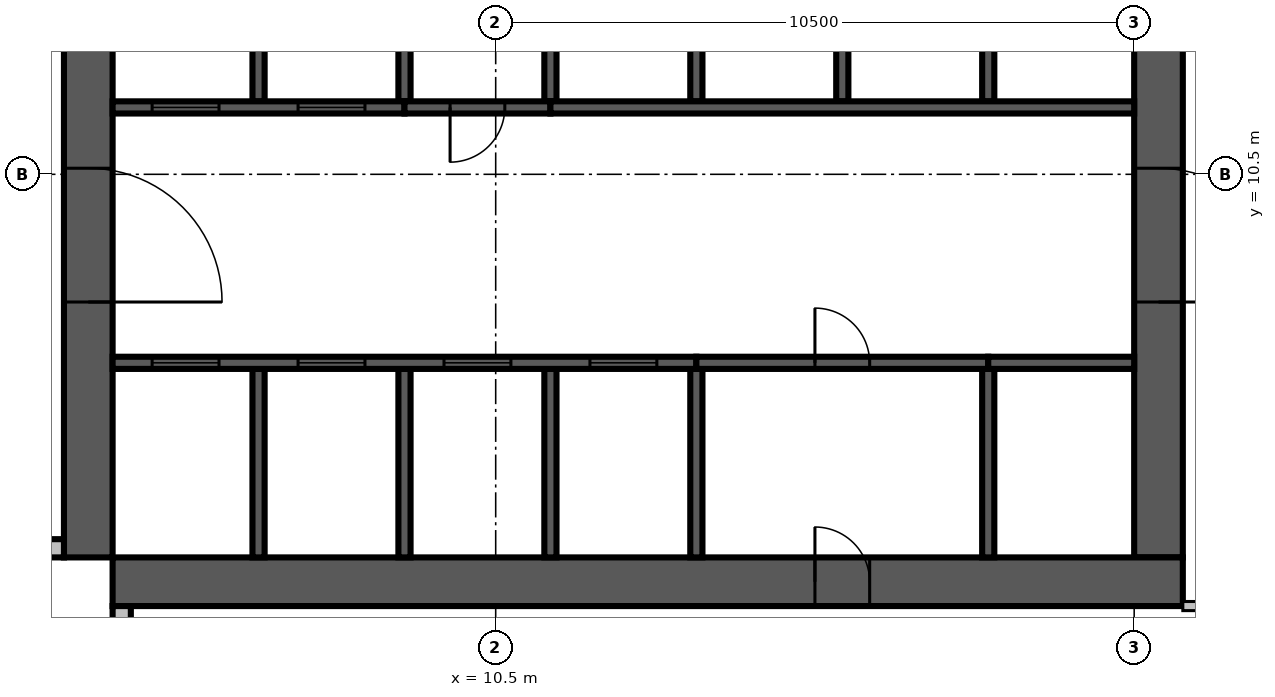
"""IFC4 building model, lengths in metres.
Left out: names, types, materials, properties, quantities, classifications, styles, units other than length and angle.
Written with IfcOpenShell. Run it as: python <this file> out.ifc"""

import sys

from ifc_helpers import new_model, si_unit, direction, frame, frame_2d, origin, place, context, subcontext, project, spatial, rectangle, extrude, source, transform, mapped, element, fill, save


model = new_model("IFC4")
c1 = context("Model", 3, precision=1e-05, world=origin(), true_north=direction((0.0, 1.0)))
c2 = subcontext(c1, "Body", "Model", "MODEL_VIEW")
j1 = project(units=[si_unit("LENGTHUNIT", "METRE"), si_unit("PLANEANGLEUNIT", "RADIAN")], contexts=[c1])
p1 = place(None, origin())
s1 = spatial("IfcSite", under=j1, at=p1, CompositionType="ELEMENT")
p2 = place(p1, origin())
s2 = spatial("IfcBuilding", under=s1, at=p2, CompositionType="ELEMENT")
p3 = place(p2, frame((0.0, 0.0, 189.2)))
s3 = spatial("IfcBuildingStorey", under=s2, at=p3, CompositionType="ELEMENT", Elevation=189.2)
m1 = source(origin(), c2, "Body", "SweptSolid", [
    extrude(rectangle(XDim=17.6, YDim=0.8, at=frame_2d((8.8, 0.0))), origin(), (0.0, 0.0, 1.0), 3.8),
])
p4 = place(p3, frame((3.8, 4.2, 0.0), z_axis=(0.0, 0.0, 1.0), x_axis=(0.0, 1.0, 0.0)))
e1 = element("IfcWall", 1, at=p4, inside=s3, PredefinedType="SHEAR", context=c2, shape_type="MappedRepresentation", body=[
    mapped(m1, transform((0.0, 0.0, 0.0), scale=1.0)),
])
m2 = source(origin(), c2, "Body", "SweptSolid", [
    extrude(rectangle(XDim=2.2, YDim=2.1, at=frame_2d((1.1, 1.05))), frame((0.0, 0.41, 0.0), z_axis=(0.0, -1.0, 0.0), x_axis=(1.0, 0.0, 0.0)), (0.0, 0.0, 1.0), 0.82),
])
p5 = place(p4, frame((4.2, 0.0, 0.0)))
e2 = element("IfcOpeningElement", 2, at=p5, cuts=e1, PredefinedType="OPENING", context=c2, shape_type="MappedRepresentation", body=[
    mapped(m2, transform((0.0, 0.0, 0.0), scale=1.0)),
])
m3 = source(origin(), c2, "Body", "SweptSolid", [
    extrude(rectangle(XDim=0.9, YDim=2.1, at=frame_2d((0.45, 1.05))), frame((0.0, 0.41, 0.0), z_axis=(0.0, -1.0, 0.0), x_axis=(1.0, 0.0, 0.0)), (0.0, 0.0, 1.0), 0.82),
])
p6 = place(p4, frame((10.95, 0.0, 0.0)))
e3 = element("IfcOpeningElement", 3, at=p6, cuts=e1, PredefinedType="OPENING", context=c2, shape_type="MappedRepresentation", body=[
    mapped(m3, transform((0.0, 0.0, 0.0), scale=1.0)),
])
m4 = source(origin(), c2, "Body", "SweptSolid", [
    extrude(rectangle(XDim=16.8, YDim=0.8, at=frame_2d((8.4, 0.0))), origin(), (0.0, 0.0, 1.0), 3.8),
])
p7 = place(p3, frame((21.4, 4.2, 0.0), z_axis=(0.0, 0.0, 1.0), x_axis=(0.0, 1.0, 0.0)))
e4 = element("IfcWall", 4, at=p7, inside=s3, PredefinedType="SHEAR", context=c2, shape_type="MappedRepresentation", body=[
    mapped(m4, transform((0.0, 0.0, 0.0), scale=1.0)),
])
p8 = place(p7, frame((4.2, 0.0, 0.0)))
e5 = element("IfcOpeningElement", 5, at=p8, cuts=e4, PredefinedType="OPENING", context=c2, shape_type="MappedRepresentation", body=[
    mapped(m2, transform((0.0, 0.0, 0.0), scale=1.0)),
])
m5 = source(origin(), c2, "Body", "SweptSolid", [
    extrude(rectangle(XDim=1.2, YDim=2.1, at=frame_2d((0.6, 1.05))), frame((0.0, 0.41, 0.0), z_axis=(0.0, -1.0, 0.0), x_axis=(1.0, 0.0, 0.0)), (0.0, 0.0, 1.0), 0.82),
])
p9 = place(p7, frame((14.7, 0.0, 0.0)))
e6 = element("IfcOpeningElement", 6, at=p9, cuts=e4, PredefinedType="OPENING", context=c2, shape_type="MappedRepresentation", body=[
    mapped(m5, transform((0.0, 0.0, 0.0), scale=1.0)),
])
p10 = place(p3, frame((4.2, 3.8, 0.0), z_axis=(0.0, 0.0, 1.0), x_axis=(1.0, 0.0, 0.0)))
e7 = element("IfcWall", 7, at=p10, inside=s3, PredefinedType="SHEAR", context=c2, shape_type="MappedRepresentation", body=[
    mapped(m1, transform((0.0, 0.0, 0.0), scale=1.0)),
])
p11 = place(p10, frame((11.55, 0.0, 0.0)))
e8 = element("IfcOpeningElement", 8, at=p11, cuts=e7, PredefinedType="OPENING", context=c2, shape_type="MappedRepresentation", body=[
    mapped(m3, transform((0.0, 0.0, 0.0), scale=1.0)),
])
m6 = source(origin(), c2, "Body", "SweptSolid", [
    extrude(rectangle(XDim=3.4, YDim=0.3, at=frame_2d((1.7, 0.0))), origin(), (0.0, 0.0, 1.0), 3.4),
])
p12 = place(p3, frame((0.0, 4.35, 0.0), z_axis=(0.0, 0.0, 1.0), x_axis=(1.0, 0.0, 0.0)))
e9 = element("IfcWall", 9, at=p12, inside=s3, PredefinedType="STANDARD", context=c2, shape_type="MappedRepresentation", body=[
    mapped(m6, transform((0.0, 0.0, 0.0), scale=1.0)),
])
m7 = source(origin(), c2, "Body", "SweptSolid", [
    extrude(rectangle(XDim=1.8, YDim=2.3, at=frame_2d((0.9, 1.15))), frame((0.0, 0.16, 0.0), z_axis=(0.0, -1.0, 0.0), x_axis=(1.0, 0.0, 0.0)), (0.0, 0.0, 1.0), 0.32),
])
p13 = place(p12, frame((1.2, 0.0, 0.6)))
e10 = element("IfcOpeningElement", 10, at=p13, cuts=e9, PredefinedType="OPENING", context=c2, shape_type="MappedRepresentation", body=[
    mapped(m7, transform((0.0, 0.0, 0.0), scale=1.0)),
])
p14 = place(p3, frame((4.35, 3.4, 0.0), z_axis=(0.0, 0.0, 1.0), x_axis=(0.0, -1.0, 0.0)))
e11 = element("IfcWall", 11, at=p14, inside=s3, PredefinedType="STANDARD", context=c2, shape_type="MappedRepresentation", body=[
    mapped(m6, transform((0.0, 0.0, 0.0), scale=1.0)),
])
p15 = place(p14, frame((0.4, 0.0, 0.6)))
e12 = element("IfcOpeningElement", 12, at=p15, cuts=e11, PredefinedType="OPENING", context=c2, shape_type="MappedRepresentation", body=[
    mapped(m7, transform((0.0, 0.0, 0.0), scale=1.0)),
])
m8 = source(origin(), c2, "Body", "SweptSolid", [
    extrude(rectangle(XDim=3.1, YDim=0.2, at=frame_2d((1.55, 0.0))), origin(), (0.0, 0.0, 1.0), 3.8),
])
for number, where, z_axis, x_axis in (
    (13, (6.6, 4.2, 0.0), (0.0, 0.0, 1.0), (0.0, 1.0, 0.0)),
    (14, (9.0, 4.2, 0.0), (0.0, 0.0, 1.0), (0.0, 1.0, 0.0)),
    (15, (11.4, 4.2, 0.0), (0.0, 0.0, 1.0), (0.0, 1.0, 0.0)),
):
    element("IfcWall", number, at=place(p3, frame(where, z_axis=z_axis, x_axis=x_axis)), inside=s3, PredefinedType="SOLIDWALL", context=c2, shape_type="MappedRepresentation", body=[
        mapped(m8, transform((0.0, 0.0, 0.0), scale=1.0)),
    ])
m9 = source(origin(), c2, "Body", "SweptSolid", [
    extrude(rectangle(XDim=3.1, YDim=0.2, at=frame_2d((1.55, 0.0))), origin(), (0.0, 0.0, 1.0), 3.4),
])
for number, where, z_axis, x_axis in (
    (16, (13.8, 4.2, 0.0), (0.0, 0.0, 1.0), (0.0, 1.0, 0.0)),
    (17, (18.6, 4.2, 0.0), (0.0, 0.0, 1.0), (0.0, 1.0, 0.0)),
):
    element("IfcWall", number, at=place(p3, frame(where, z_axis=z_axis, x_axis=x_axis)), inside=s3, PredefinedType="SOLIDWALL", context=c2, shape_type="MappedRepresentation", body=[
        mapped(m9, transform((0.0, 0.0, 0.0), scale=1.0)),
    ])
m10 = source(origin(), c2, "Body", "SweptSolid", [
    extrude(rectangle(XDim=3.0, YDim=0.2, at=frame_2d((1.5, 0.0))), origin(), (0.0, 0.0, 1.0), 3.8),
])
p16 = place(p3, frame((6.6, 11.7, 0.0), z_axis=(0.0, 0.0, 1.0), x_axis=(0.0, 1.0, 0.0)))
e18 = element("IfcWall", 18, at=p16, inside=s3, PredefinedType="SOLIDWALL", context=c2, shape_type="MappedRepresentation", body=[
    mapped(m10, transform((0.0, 0.0, 0.0), scale=1.0)),
])
m11 = source(origin(), c2, "Body", "SweptSolid", [
    extrude(rectangle(XDim=3.0, YDim=0.2, at=frame_2d((1.5, 0.0))), origin(), (0.0, 0.0, 1.0), 3.4),
])
for number, where, z_axis, x_axis in (
    (19, (9.0, 11.7, 0.0), (0.0, 0.0, 1.0), (0.0, 1.0, 0.0)),
    (20, (11.4, 11.7, 0.0), (0.0, 0.0, 1.0), (0.0, 1.0, 0.0)),
):
    element("IfcWall", number, at=place(p3, frame(where, z_axis=z_axis, x_axis=x_axis)), inside=s3, PredefinedType="SOLIDWALL", context=c2, shape_type="MappedRepresentation", body=[
        mapped(m11, transform((0.0, 0.0, 0.0), scale=1.0)),
    ])
for number, where, z_axis, x_axis in (
    (21, (13.8, 11.7, 0.0), (0.0, 0.0, 1.0), (0.0, 1.0, 0.0)),
    (22, (16.2, 11.7, 0.0), (0.0, 0.0, 1.0), (0.0, 1.0, 0.0)),
    (23, (18.6, 11.7, 0.0), (0.0, 0.0, 1.0), (0.0, 1.0, 0.0)),
):
    element("IfcWall", number, at=place(p3, frame(where, z_axis=z_axis, x_axis=x_axis)), inside=s3, PredefinedType="SOLIDWALL", context=c2, shape_type="MappedRepresentation", body=[
        mapped(m10, transform((0.0, 0.0, 0.0), scale=1.0)),
    ])
m12 = source(origin(), c2, "Body", "SweptSolid", [
    extrude(rectangle(XDim=9.6, YDim=0.2, at=frame_2d((4.8, 0.0))), origin(), (0.0, 0.0, 1.0), 3.8),
])
p17 = place(p3, frame((4.2, 7.4, 0.0), z_axis=(0.0, 0.0, 1.0), x_axis=(1.0, 0.0, 0.0)))
e24 = element("IfcWall", 24, at=p17, inside=s3, PredefinedType="SOLIDWALL", context=c2, shape_type="MappedRepresentation", body=[
    mapped(m12, transform((0.0, 0.0, 0.0), scale=1.0)),
])
m13 = source(origin(), c2, "Body", "SweptSolid", [
    extrude(rectangle(XDim=1.1, YDim=2.1, at=frame_2d((0.55, 1.05))), frame((0.0, 0.11, 0.0), z_axis=(0.0, -1.0, 0.0), x_axis=(1.0, 0.0, 0.0)), (0.0, 0.0, 1.0), 0.22),
])
p18 = place(p17, frame((0.65, 0.0, 0.0)))
e25 = element("IfcOpeningElement", 25, at=p18, cuts=e24, PredefinedType="OPENING", context=c2, shape_type="MappedRepresentation", body=[
    mapped(m13, transform((0.0, 0.0, 0.0), scale=1.0)),
])
p19 = place(p17, frame((3.05, 0.0, 0.0)))
e26 = element("IfcOpeningElement", 26, at=p19, cuts=e24, PredefinedType="OPENING", context=c2, shape_type="MappedRepresentation", body=[
    mapped(m13, transform((0.0, 0.0, 0.0), scale=1.0)),
])
p20 = place(p17, frame((5.45, 0.0, 0.0)))
e27 = element("IfcOpeningElement", 27, at=p20, cuts=e24, PredefinedType="OPENING", context=c2, shape_type="MappedRepresentation", body=[
    mapped(m13, transform((0.0, 0.0, 0.0), scale=1.0)),
])
p21 = place(p17, frame((7.85, 0.0, 0.0)))
e28 = element("IfcOpeningElement", 28, at=p21, cuts=e24, PredefinedType="OPENING", context=c2, shape_type="MappedRepresentation", body=[
    mapped(m13, transform((0.0, 0.0, 0.0), scale=1.0)),
])
m14 = source(origin(), c2, "Body", "SweptSolid", [
    extrude(rectangle(XDim=4.8, YDim=0.2, at=frame_2d((2.4, 0.0))), origin(), (0.0, 0.0, 1.0), 3.4),
])
p22 = place(p3, frame((13.8, 7.4, 0.0), z_axis=(0.0, 0.0, 1.0), x_axis=(1.0, 0.0, 0.0)))
e29 = element("IfcWall", 29, at=p22, inside=s3, PredefinedType="SOLIDWALL", context=c2, shape_type="MappedRepresentation", body=[
    mapped(m14, transform((0.0, 0.0, 0.0), scale=1.0)),
])
m15 = source(origin(), c2, "Body", "SweptSolid", [
    extrude(rectangle(XDim=0.9, YDim=2.1, at=frame_2d((0.45, 1.05))), frame((0.0, 0.11, 0.0), z_axis=(0.0, -1.0, 0.0), x_axis=(1.0, 0.0, 0.0)), (0.0, 0.0, 1.0), 0.22),
])
p23 = place(p22, frame((1.95, 0.0, 0.0)))
e30 = element("IfcOpeningElement", 30, at=p23, cuts=e29, PredefinedType="OPENING", context=c2, shape_type="MappedRepresentation", body=[
    mapped(m15, transform((0.0, 0.0, 0.0), scale=1.0)),
])
m16 = source(origin(), c2, "Body", "SweptSolid", [
    extrude(rectangle(XDim=2.4, YDim=0.2, at=frame_2d((1.2, 0.0))), origin(), (0.0, 0.0, 1.0), 3.8),
])
p24 = place(p3, frame((18.6, 7.4, 0.0), z_axis=(0.0, 0.0, 1.0), x_axis=(1.0, 0.0, 0.0)))
e31 = element("IfcWall", 31, at=p24, inside=s3, PredefinedType="SOLIDWALL", context=c2, shape_type="MappedRepresentation", body=[
    mapped(m16, transform((0.0, 0.0, 0.0), scale=1.0)),
])
m17 = source(origin(), c2, "Body", "SweptSolid", [
    extrude(rectangle(XDim=4.8, YDim=0.2, at=frame_2d((2.4, 0.0))), origin(), (0.0, 0.0, 1.0), 3.8),
])
p25 = place(p3, frame((4.2, 11.6, 0.0), z_axis=(0.0, 0.0, 1.0), x_axis=(1.0, 0.0, 0.0)))
e32 = element("IfcWall", 32, at=p25, inside=s3, PredefinedType="SOLIDWALL", context=c2, shape_type="MappedRepresentation", body=[
    mapped(m17, transform((0.0, 0.0, 0.0), scale=1.0)),
])
p26 = place(p25, frame((0.65, 0.0, 0.0)))
e33 = element("IfcOpeningElement", 33, at=p26, cuts=e32, PredefinedType="OPENING", context=c2, shape_type="MappedRepresentation", body=[
    mapped(m13, transform((0.0, 0.0, 0.0), scale=1.0)),
])
p27 = place(p25, frame((3.05, 0.0, 0.0)))
e34 = element("IfcOpeningElement", 34, at=p27, cuts=e32, PredefinedType="OPENING", context=c2, shape_type="MappedRepresentation", body=[
    mapped(m13, transform((0.0, 0.0, 0.0), scale=1.0)),
])
m18 = source(origin(), c2, "Body", "SweptSolid", [
    extrude(rectangle(XDim=2.4, YDim=0.2, at=frame_2d((1.2, 0.0))), origin(), (0.0, 0.0, 1.0), 3.4),
])
p28 = place(p3, frame((9.0, 11.6, 0.0), z_axis=(0.0, 0.0, 1.0), x_axis=(1.0, 0.0, 0.0)))
e35 = element("IfcWall", 35, at=p28, inside=s3, PredefinedType="SOLIDWALL", context=c2, shape_type="MappedRepresentation", body=[
    mapped(m18, transform((0.0, 0.0, 0.0), scale=1.0)),
])
p29 = place(p28, frame((0.75, 0.0, 0.0)))
e36 = element("IfcOpeningElement", 36, at=p29, cuts=e35, PredefinedType="OPENING", context=c2, shape_type="MappedRepresentation", body=[
    mapped(m15, transform((0.0, 0.0, 0.0), scale=1.0)),
])
p30 = place(p3, frame((11.4, 11.6, 0.0), z_axis=(0.0, 0.0, 1.0), x_axis=(1.0, 0.0, 0.0)))
e37 = element("IfcWall", 37, at=p30, inside=s3, PredefinedType="SOLIDWALL", context=c2, shape_type="MappedRepresentation", body=[
    mapped(m12, transform((0.0, 0.0, 0.0), scale=1.0)),
])
m19 = source(origin(), c2, "Body", "SweptSolid", [
    extrude(rectangle(XDim=7.525, YDim=0.15, at=frame_2d((3.763, 0.0))), origin(), (0.0, 0.0, 1.0), 2.9),
])
p31 = place(p3, frame((21.8, 3.4, 0.0), z_axis=(0.0, 0.0, 1.0), x_axis=(1.0, 0.0, 0.0)))
e38 = element("IfcWall", 38, at=p31, inside=s3, PredefinedType="PARTITIONING", context=c2, shape_type="MappedRepresentation", body=[
    mapped(m19, transform((0.0, 0.0, 0.0), scale=1.0)),
])
m20 = source(origin(), c2, "Body", "SweptSolid", [
    extrude(rectangle(XDim=1.0, YDim=2.1, at=frame_2d((0.5, 1.05))), frame((0.0, 0.085, 0.0), z_axis=(0.0, -1.0, 0.0), x_axis=(1.0, 0.0, 0.0)), (0.0, 0.0, 1.0), 0.17),
])
p32 = place(p31, frame((3.3, 0.0, 0.0)))
e39 = element("IfcOpeningElement", 39, at=p32, cuts=e38, PredefinedType="OPENING", context=c2, shape_type="MappedRepresentation", body=[
    mapped(m20, transform((0.0, 0.0, 0.0), scale=1.0)),
])
m21 = source(origin(), c2, "Body", "SweptSolid", [
    extrude(rectangle(XDim=0.9, YDim=2.1, at=frame_2d((0.45, 1.05))), frame((0.0, 0.085, 0.0), z_axis=(0.0, -1.0, 0.0), x_axis=(1.0, 0.0, 0.0)), (0.0, 0.0, 1.0), 0.17),
])
p33 = place(p31, frame((2.312, 0.0, 0.0)))
e40 = element("IfcOpeningElement", 40, at=p33, cuts=e38, PredefinedType="OPENING", context=c2, shape_type="MappedRepresentation", body=[
    mapped(m21, transform((0.0, 0.0, 0.0), scale=1.0)),
])
m22 = source(origin(), c2, "Body", "SweptSolid", [
    extrude(rectangle(XDim=1.1, YDim=2.1, at=frame_2d((0.55, 1.05))), frame((0.0, 0.025, 0.0), z_axis=(0.0, -1.0, 0.0), x_axis=(1.0, 0.0, 0.0)), (0.0, 0.0, 1.0), 0.05),
])
p34 = place(p18, origin())
e41 = element("IfcDoor", 41, at=p34, inside=s3, OperationType="SLIDING_TO_LEFT", PredefinedType="DOOR", context=c2, shape_type="MappedRepresentation", body=[
    mapped(m22, transform((0.0, 0.0, 0.0), scale=1.0)),
])
fill(e25, e41)
p35 = place(p19, origin())
e42 = element("IfcDoor", 42, at=p35, inside=s3, OperationType="SLIDING_TO_LEFT", PredefinedType="DOOR", context=c2, shape_type="MappedRepresentation", body=[
    mapped(m22, transform((0.0, 0.0, 0.0), scale=1.0)),
])
fill(e26, e42)
p36 = place(p20, origin())
e43 = element("IfcDoor", 43, at=p36, inside=s3, OperationType="SLIDING_TO_LEFT", PredefinedType="DOOR", context=c2, shape_type="MappedRepresentation", body=[
    mapped(m22, transform((0.0, 0.0, 0.0), scale=1.0)),
])
fill(e27, e43)
p37 = place(p21, origin())
e44 = element("IfcDoor", 44, at=p37, inside=s3, OperationType="SLIDING_TO_LEFT", PredefinedType="DOOR", context=c2, shape_type="MappedRepresentation", body=[
    mapped(m22, transform((0.0, 0.0, 0.0), scale=1.0)),
])
fill(e28, e44)
m23 = source(origin(), c2, "Body", "SweptSolid", [
    extrude(rectangle(XDim=0.9, YDim=2.1, at=frame_2d((0.45, 1.05))), frame((0.0, 0.025, 0.0), z_axis=(0.0, -1.0, 0.0), x_axis=(1.0, 0.0, 0.0)), (0.0, 0.0, 1.0), 0.05),
])
p38 = place(p23, origin())
e45 = element("IfcDoor", 45, at=p38, inside=s3, OperationType="SINGLE_SWING_LEFT", PredefinedType="DOOR", context=c2, shape_type="MappedRepresentation", body=[
    mapped(m23, transform((0.0, 0.0, 0.0), scale=1.0)),
])
fill(e30, e45)
p39 = place(p26, origin())
e46 = element("IfcDoor", 46, at=p39, inside=s3, OperationType="SLIDING_TO_LEFT", PredefinedType="DOOR", context=c2, shape_type="MappedRepresentation", body=[
    mapped(m22, transform((0.0, 0.0, 0.0), scale=1.0)),
])
fill(e33, e46)
p40 = place(p27, origin())
e47 = element("IfcDoor", 47, at=p40, inside=s3, OperationType="SLIDING_TO_LEFT", PredefinedType="DOOR", context=c2, shape_type="MappedRepresentation", body=[
    mapped(m22, transform((0.0, 0.0, 0.0), scale=1.0)),
])
fill(e34, e47)
p41 = place(p29, origin())
e48 = element("IfcDoor", 48, at=p41, inside=s3, OperationType="SINGLE_SWING_RIGHT", PredefinedType="DOOR", context=c2, shape_type="MappedRepresentation", body=[
    mapped(m23, transform((0.0, 0.0, 0.0), scale=1.0)),
])
fill(e36, e48)
m24 = source(origin(), c2, "Body", "SweptSolid", [
    extrude(rectangle(XDim=2.2, YDim=2.1, at=frame_2d((1.1, 1.05))), frame((0.0, 0.025, 0.0), z_axis=(0.0, -1.0, 0.0), x_axis=(1.0, 0.0, 0.0)), (0.0, 0.0, 1.0), 0.05),
])
p42 = place(p8, origin())
e49 = element("IfcDoor", 49, at=p42, inside=s3, OperationType="DOUBLE_DOOR_SINGLE_SWING", PredefinedType="DOOR", context=c2, shape_type="MappedRepresentation", body=[
    mapped(m24, transform((0.0, 0.0, 0.0), scale=1.0)),
])
fill(e5, e49)
p43 = place(p5, origin())
e50 = element("IfcDoor", 50, at=p43, inside=s3, OperationType="DOUBLE_DOOR_SINGLE_SWING", PredefinedType="DOOR", context=c2, shape_type="MappedRepresentation", body=[
    mapped(m24, transform((0.0, 0.0, 0.0), scale=1.0)),
])
fill(e2, e50)
p44 = place(p11, origin())
e51 = element("IfcDoor", 51, at=p44, inside=s3, OperationType="SINGLE_SWING_LEFT", PredefinedType="DOOR", context=c2, shape_type="MappedRepresentation", body=[
    mapped(m23, transform((0.0, 0.0, 0.0), scale=1.0)),
])
fill(e8, e51)
save(model, sys.argv[1])
